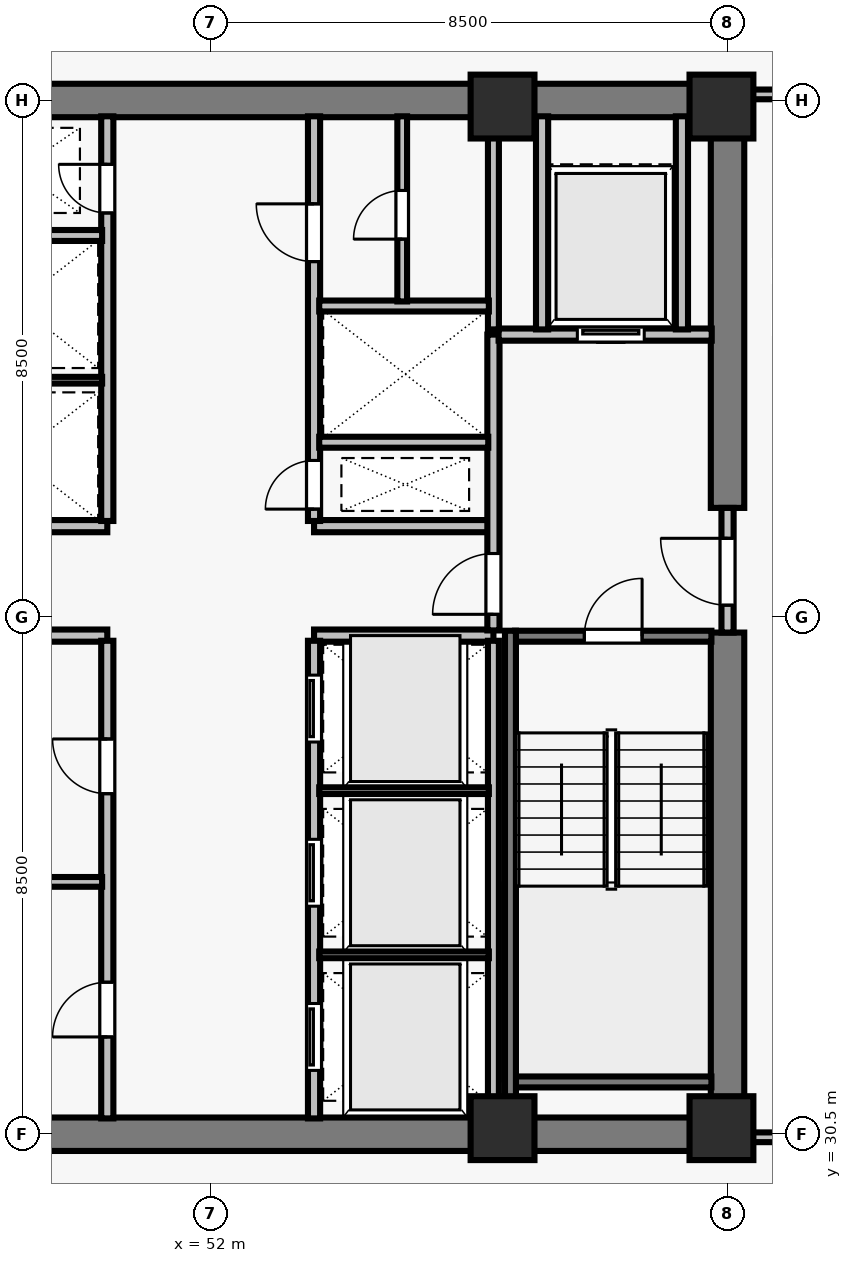
"""IFC4 building model, lengths in metres.
Left out: names, types, materials, properties, quantities, classifications, styles, units other than length and angle.
Written with IfcOpenShell. Run it as: python <this file> out.ifc"""

import sys

from ifc_helpers import new_model, si_unit, direction, frame, frame_2d, origin, origin_2d, place, context, subcontext, project, spatial, rectangle, extrude, element, fill, save


model = new_model("IFC4")
c1 = context("Model", 3, precision=1e-05, world=origin(), true_north=direction((0.0, 1.0)))
c2 = subcontext(c1, "Body", "Model", "MODEL_VIEW")
j1 = project(units=[si_unit("LENGTHUNIT", "METRE"), si_unit("PLANEANGLEUNIT", "RADIAN")], contexts=[c1])
p1 = place(None, origin())
s1 = spatial("IfcSite", under=j1, at=p1, CompositionType="ELEMENT")
p2 = place(p1, origin())
s2 = spatial("IfcBuilding", under=s1, at=p2, CompositionType="ELEMENT")
p3 = place(p2, frame((0.0, 0.0, 148.0)))
s3 = spatial("IfcBuildingStorey", under=s2, at=p3, CompositionType="ELEMENT", Elevation=148.0)
for number, where, z_axis, x_axis in (
    (1, (56.8, 30.6, 0.0), (0.0, 0.0, 1.0), (1.0, 0.0, 0.0)),
    (2, (60.4, 30.6, 0.0), (0.0, 0.0, 1.0), (1.0, 0.0, 0.0)),
    (3, (56.8, 47.4, 0.0), (0.0, 0.0, 1.0), (1.0, 0.0, 0.0)),
    (4, (60.4, 47.4, 0.0), (0.0, 0.0, 1.0), (1.0, 0.0, 0.0)),
):
    element("IfcColumn", number, at=place(p3, frame(where, z_axis=z_axis, x_axis=x_axis)), inside=s3, PredefinedType="COLUMN", context=c2, shape_type="SweptSolid", body=[
        extrude(rectangle(XDim=1.05, YDim=1.05, at=origin_2d()), origin(), (0.0, 0.0, 1.0), 3.5),
    ])
for number, where, z_axis, x_axis in (
    (5, (43.225, 30.5, 0.0), (0.0, 0.0, 1.0), (1.0, 0.0, 0.0)),
    (6, (43.225, 47.5, 0.0), (0.0, 0.0, 1.0), (1.0, 0.0, 0.0)),
):
    element("IfcWall", number, at=place(p3, frame(where, z_axis=z_axis, x_axis=x_axis)), inside=s3, PredefinedType="SHEAR", context=c2, shape_type="SweptSolid", body=[
        extrude(rectangle(XDim=17.55, YDim=0.55, at=frame_2d((8.775, 0.0))), origin(), (0.0, 0.0, 1.0), 3.28),
    ])
p4 = place(p3, frame((60.5, 30.765, 0.0), z_axis=(0.0, 0.0, 1.0), x_axis=(0.0, 1.0, 0.0)))
e7 = element("IfcWall", 7, at=p4, inside=s3, PredefinedType="SHEAR", context=c2, shape_type="SweptSolid", body=[
    extrude(rectangle(XDim=7.985, YDim=0.55, at=frame_2d((3.993, 0.0))), origin(), (0.0, 0.0, 1.0), 3.28),
])
p5 = place(p3, frame((60.5, 40.8, 0.0), z_axis=(0.0, 0.0, 1.0), x_axis=(0.0, 1.0, 0.0)))
e8 = element("IfcWall", 8, at=p5, inside=s3, PredefinedType="SHEAR", context=c2, shape_type="SweptSolid", body=[
    extrude(rectangle(XDim=6.435, YDim=0.55, at=frame_2d((3.218, 0.0))), origin(), (0.0, 0.0, 1.0), 3.28),
])
for number, where, z_axis, x_axis in (
    (9, (47.35, 38.7, 0.0), (0.0, 0.0, 1.0), (1.0, 0.0, 0.0)),
    (10, (47.35, 40.5, 0.0), (0.0, 0.0, 1.0), (1.0, 0.0, 0.0)),
    (11, (53.7, 38.7, 0.0), (0.0, 0.0, 1.0), (1.0, 0.0, 0.0)),
    (12, (53.7, 40.5, 0.0), (0.0, 0.0, 1.0), (1.0, 0.0, 0.0)),
):
    element("IfcWall", number, at=place(p3, frame(where, z_axis=z_axis, x_axis=x_axis)), inside=s3, PredefinedType="SOLIDWALL", context=c2, shape_type="SweptSolid", body=[
        extrude(rectangle(XDim=2.95, YDim=0.2, at=frame_2d((1.475, 0.0))), origin(), (0.0, 0.0, 1.0), 3.28),
    ])
p6 = place(p3, frame((50.3, 30.76, 0.0), z_axis=(0.0, 0.0, 1.0), x_axis=(0.0, 1.0, 0.0)))
e13 = element("IfcWall", 13, at=p6, inside=s3, PredefinedType="SOLIDWALL", context=c2, shape_type="SweptSolid", body=[
    extrude(rectangle(XDim=7.855, YDim=0.2, at=frame_2d((3.927, 0.0))), origin(), (0.0, 0.0, 1.0), 3.28),
])
p7 = place(p6, frame((1.34, 0.0, 0.0)))
e14 = element("IfcOpeningElement", 14, at=p7, cuts=e13, PredefinedType="OPENING", context=c2, shape_type="SweptSolid", body=[
    extrude(rectangle(XDim=0.9, YDim=2.12, at=frame_2d((0.45, 1.06))), frame((0.0, 0.11, 0.0), z_axis=(0.0, -1.0, 0.0), x_axis=(1.0, 0.0, 0.0)), (0.0, 0.0, 1.0), 0.22),
])
p8 = place(p6, frame((5.34, 0.0, 0.0)))
e15 = element("IfcOpeningElement", 15, at=p8, cuts=e13, PredefinedType="OPENING", context=c2, shape_type="SweptSolid", body=[
    extrude(rectangle(XDim=0.9, YDim=2.12, at=frame_2d((0.45, 1.06))), frame((0.0, 0.11, 0.0), z_axis=(0.0, -1.0, 0.0), x_axis=(1.0, 0.0, 0.0)), (0.0, 0.0, 1.0), 0.22),
])
p9 = place(p3, frame((53.7, 30.76, 0.0), z_axis=(0.0, 0.0, 1.0), x_axis=(0.0, 1.0, 0.0)))
e16 = element("IfcWall", 16, at=p9, inside=s3, PredefinedType="SOLIDWALL", context=c2, shape_type="SweptSolid", body=[
    extrude(rectangle(XDim=7.855, YDim=0.2, at=frame_2d((3.927, 0.0))), origin(), (0.0, 0.0, 1.0), 3.28),
])
p10 = place(p9, frame((0.79, 0.0, 0.0)))
e17 = element("IfcOpeningElement", 17, at=p10, cuts=e16, PredefinedType="OPENING", context=c2, shape_type="SweptSolid", body=[
    extrude(rectangle(XDim=1.1, YDim=2.2, at=frame_2d((0.55, 1.1))), frame((0.0, 0.11, 0.0), z_axis=(0.0, -1.0, 0.0), x_axis=(1.0, 0.0, 0.0)), (0.0, 0.0, 1.0), 0.22),
])
p11 = place(p9, frame((3.49, 0.0, 0.0)))
e18 = element("IfcOpeningElement", 18, at=p11, cuts=e16, PredefinedType="OPENING", context=c2, shape_type="SweptSolid", body=[
    extrude(rectangle(XDim=1.1, YDim=2.2, at=frame_2d((0.55, 1.1))), frame((0.0, 0.11, 0.0), z_axis=(0.0, -1.0, 0.0), x_axis=(1.0, 0.0, 0.0)), (0.0, 0.0, 1.0), 0.22),
])
p12 = place(p9, frame((6.19, 0.0, 0.0)))
e19 = element("IfcOpeningElement", 19, at=p12, cuts=e16, PredefinedType="OPENING", context=c2, shape_type="SweptSolid", body=[
    extrude(rectangle(XDim=1.1, YDim=2.2, at=frame_2d((0.55, 1.1))), frame((0.0, 0.11, 0.0), z_axis=(0.0, -1.0, 0.0), x_axis=(1.0, 0.0, 0.0)), (0.0, 0.0, 1.0), 0.22),
])
p13 = place(p3, frame((50.3, 40.585, 0.0), z_axis=(0.0, 0.0, 1.0), x_axis=(0.0, 1.0, 0.0)))
e20 = element("IfcWall", 20, at=p13, inside=s3, PredefinedType="SOLIDWALL", context=c2, shape_type="SweptSolid", body=[
    extrude(rectangle(XDim=6.655, YDim=0.2, at=frame_2d((3.328, 0.0))), origin(), (0.0, 0.0, 1.0), 3.28),
])
p14 = place(p13, frame((5.065, 0.0, 0.0)))
e21 = element("IfcOpeningElement", 21, at=p14, cuts=e20, PredefinedType="OPENING", context=c2, shape_type="SweptSolid", body=[
    extrude(rectangle(XDim=0.8, YDim=2.08, at=frame_2d((0.4, 1.04))), frame((0.0, 0.11, 0.0), z_axis=(0.0, -1.0, 0.0), x_axis=(1.0, 0.0, 0.0)), (0.0, 0.0, 1.0), 0.22),
])
p15 = place(p3, frame((53.7, 40.585, 0.0), z_axis=(0.0, 0.0, 1.0), x_axis=(0.0, 1.0, 0.0)))
e22 = element("IfcWall", 22, at=p15, inside=s3, PredefinedType="SOLIDWALL", context=c2, shape_type="SweptSolid", body=[
    extrude(rectangle(XDim=6.655, YDim=0.2, at=frame_2d((3.328, 0.0))), origin(), (0.0, 0.0, 1.0), 3.28),
])
p16 = place(p15, frame((0.195, 0.0, 0.0)))
e23 = element("IfcOpeningElement", 23, at=p16, cuts=e22, PredefinedType="OPENING", context=c2, shape_type="SweptSolid", body=[
    extrude(rectangle(XDim=0.8, YDim=2.08, at=frame_2d((0.4, 1.04))), frame((0.0, 0.11, 0.0), z_axis=(0.0, -1.0, 0.0), x_axis=(1.0, 0.0, 0.0)), (0.0, 0.0, 1.0), 0.22),
])
p17 = place(p15, frame((4.265, 0.0, 0.0)))
e24 = element("IfcOpeningElement", 24, at=p17, cuts=e22, PredefinedType="OPENING", context=c2, shape_type="SweptSolid", body=[
    extrude(rectangle(XDim=0.95, YDim=2.12, at=frame_2d((0.475, 1.06))), frame((0.0, 0.11, 0.0), z_axis=(0.0, -1.0, 0.0), x_axis=(1.0, 0.0, 0.0)), (0.0, 0.0, 1.0), 0.22),
])
p18 = place(p3, frame((60.5, 38.75, 0.0), z_axis=(0.0, 0.0, 1.0), x_axis=(0.0, 1.0, 0.0)))
e25 = element("IfcWall", 25, at=p18, inside=s3, PredefinedType="SOLIDWALL", context=c2, shape_type="SweptSolid", body=[
    extrude(rectangle(XDim=2.05, YDim=0.2, at=frame_2d((1.025, 0.0))), origin(), (0.0, 0.0, 1.0), 3.28),
])
p19 = place(p18, frame((0.45, 0.0, 0.0)))
e26 = element("IfcOpeningElement", 26, at=p19, cuts=e25, PredefinedType="OPENING", context=c2, shape_type="SweptSolid", body=[
    extrude(rectangle(XDim=1.1, YDim=2.15, at=frame_2d((0.55, 1.075))), frame((0.0, 0.11, 0.0), z_axis=(0.0, -1.0, 0.0), x_axis=(1.0, 0.0, 0.0)), (0.0, 0.0, 1.0), 0.22),
])
p20 = place(p3, frame((56.65, 38.785, 0.0), z_axis=(0.0, 0.0, 1.0), x_axis=(0.0, 1.0, 0.0)))
e27 = element("IfcWall", 27, at=p20, inside=s3, PredefinedType="SOLIDWALL", context=c2, shape_type="SweptSolid", body=[
    extrude(rectangle(XDim=4.865, YDim=0.2, at=frame_2d((2.433, 0.0))), origin(), (0.0, 0.0, 1.0), 3.28),
])
p21 = place(p20, frame((0.265, 0.0, 0.0)))
e28 = element("IfcOpeningElement", 28, at=p21, cuts=e27, PredefinedType="OPENING", context=c2, shape_type="SweptSolid", body=[
    extrude(rectangle(XDim=1.0, YDim=2.15, at=frame_2d((0.5, 1.075))), frame((0.0, 0.11, 0.0), z_axis=(0.0, -1.0, 0.0), x_axis=(1.0, 0.0, 0.0)), (0.0, 0.0, 1.0), 0.22),
])
p22 = place(p3, frame((56.735, 43.65, 0.0), z_axis=(0.0, 0.0, 1.0), x_axis=(1.0, 0.0, 0.0)))
e29 = element("IfcWall", 29, at=p22, inside=s3, PredefinedType="SOLIDWALL", context=c2, shape_type="SweptSolid", body=[
    extrude(rectangle(XDim=3.505, YDim=0.2, at=frame_2d((1.752, 0.0))), origin(), (0.0, 0.0, 1.0), 3.28),
])
p23 = place(p22, frame((1.295, 0.0, 0.0)))
e30 = element("IfcOpeningElement", 30, at=p23, cuts=e29, PredefinedType="OPENING", context=c2, shape_type="SweptSolid", body=[
    extrude(rectangle(XDim=1.1, YDim=2.2, at=frame_2d((0.55, 1.1))), frame((0.0, 0.11, 0.0), z_axis=(0.0, -1.0, 0.0), x_axis=(1.0, 0.0, 0.0)), (0.0, 0.0, 1.0), 0.22),
])
for number, where, z_axis, x_axis in (
    (31, (57.45, 43.735, 0.0), (0.0, 0.0, 1.0), (0.0, 1.0, 0.0)),
    (32, (59.75, 43.735, 0.0), (0.0, 0.0, 1.0), (0.0, 1.0, 0.0)),
):
    element("IfcWall", number, at=place(p3, frame(where, z_axis=z_axis, x_axis=x_axis)), inside=s3, PredefinedType="SOLIDWALL", context=c2, shape_type="SweptSolid", body=[
        extrude(rectangle(XDim=3.505, YDim=0.2, at=frame_2d((1.752, 0.0))), origin(), (0.0, 0.0, 1.0), 3.28),
    ])
p24 = place(p3, frame((47.415, 34.65, 0.0), z_axis=(0.0, 0.0, 1.0), x_axis=(1.0, 0.0, 0.0)))
e33 = element("IfcWall", 33, at=p24, inside=s3, PredefinedType="PARTITIONING", context=c2, shape_type="SweptSolid", body=[
    extrude(rectangle(XDim=2.8, YDim=0.16, at=frame_2d((1.4, 0.0))), origin(), (0.0, 0.0, 1.0), 3.28),
])
p25 = place(p3, frame((56.65, 30.76, 0.0), z_axis=(0.0, 0.0, 1.0), x_axis=(0.0, 1.0, 0.0)))
e34 = element("IfcWall", 34, at=p25, inside=s3, PredefinedType="SOLIDWALL", context=c2, shape_type="SweptSolid", body=[
    extrude(rectangle(XDim=7.855, YDim=0.18, at=frame_2d((3.927, 0.0))), origin(), (0.0, 0.0, 1.0), 3.28),
])
for number, where, z_axis, x_axis in (
    (35, (53.785, 33.45, 0.0), (0.0, 0.0, 1.0), (1.0, 0.0, 0.0)),
    (36, (53.785, 36.15, 0.0), (0.0, 0.0, 1.0), (1.0, 0.0, 0.0)),
):
    element("IfcWall", number, at=place(p3, frame(where, z_axis=z_axis, x_axis=x_axis)), inside=s3, PredefinedType="PARTITIONING", context=c2, shape_type="SweptSolid", body=[
        extrude(rectangle(XDim=2.79, YDim=0.11, at=frame_2d((1.395, 0.0))), origin(), (0.0, 0.0, 1.0), 3.28),
    ])
p26 = place(p3, frame((47.435, 42.9, 0.0), z_axis=(0.0, 0.0, 1.0), x_axis=(1.0, 0.0, 0.0)))
e37 = element("IfcWall", 37, at=p26, inside=s3, PredefinedType="PARTITIONING", context=c2, shape_type="SweptSolid", body=[
    extrude(rectangle(XDim=2.78, YDim=0.11, at=frame_2d((1.39, 0.0))), origin(), (0.0, 0.0, 1.0), 3.28),
])
p27 = place(p3, frame((47.425, 45.28, 0.0), z_axis=(0.0, 0.0, 1.0), x_axis=(1.0, 0.0, 0.0)))
e38 = element("IfcWall", 38, at=p27, inside=s3, PredefinedType="SOLIDWALL", context=c2, shape_type="SweptSolid", body=[
    extrude(rectangle(XDim=2.79, YDim=0.18, at=frame_2d((1.395, 0.0))), origin(), (0.0, 0.0, 1.0), 3.28),
])
p28 = place(p3, frame((56.65, 43.735, 0.0), z_axis=(0.0, 0.0, 1.0), x_axis=(0.0, 1.0, 0.0)))
e39 = element("IfcWall", 39, at=p28, inside=s3, PredefinedType="SOLIDWALL", context=c2, shape_type="SweptSolid", body=[
    extrude(rectangle(XDim=3.505, YDim=0.18, at=frame_2d((1.752, 0.0))), origin(), (0.0, 0.0, 1.0), 3.28),
])
p29 = place(p3, frame((53.785, 41.88, 0.0), z_axis=(0.0, 0.0, 1.0), x_axis=(1.0, 0.0, 0.0)))
e40 = element("IfcWall", 40, at=p29, inside=s3, PredefinedType="SOLIDWALL", context=c2, shape_type="SweptSolid", body=[
    extrude(rectangle(XDim=2.78, YDim=0.18, at=frame_2d((1.39, 0.0))), origin(), (0.0, 0.0, 1.0), 3.28),
])
p30 = place(p3, frame((53.785, 44.12, 0.0), z_axis=(0.0, 0.0, 1.0), x_axis=(1.0, 0.0, 0.0)))
e41 = element("IfcWall", 41, at=p30, inside=s3, PredefinedType="SOLIDWALL", context=c2, shape_type="SweptSolid", body=[
    extrude(rectangle(XDim=2.79, YDim=0.18, at=frame_2d((1.395, 0.0))), origin(), (0.0, 0.0, 1.0), 3.28),
])
p31 = place(p3, frame((55.15, 44.195, 0.0), z_axis=(0.0, 0.0, 1.0), x_axis=(0.0, 1.0, 0.0)))
e42 = element("IfcWall", 42, at=p31, inside=s3, PredefinedType="PARTITIONING", context=c2, shape_type="SweptSolid", body=[
    extrude(rectangle(XDim=3.045, YDim=0.16, at=frame_2d((1.522, 0.0))), origin(), (0.0, 0.0, 1.0), 3.28),
])
p32 = place(p31, frame((1.025, 0.0, 0.0)))
e43 = element("IfcOpeningElement", 43, at=p32, cuts=e42, PredefinedType="OPENING", context=c2, shape_type="SweptSolid", body=[
    extrude(rectangle(XDim=0.8, YDim=2.1, at=frame_2d((0.4, 1.05))), frame((0.0, 0.09, 0.0), z_axis=(0.0, -1.0, 0.0), x_axis=(1.0, 0.0, 0.0)), (0.0, 0.0, 1.0), 0.18),
])
p33 = place(p3, frame((60.765, 30.45, 0.0), z_axis=(0.0, 0.0, 1.0), x_axis=(1.0, 0.0, 0.0)))
e44 = element("IfcWall", 44, at=p33, inside=s3, PredefinedType="PARTITIONING", context=c2, shape_type="SweptSolid", body=[
    extrude(rectangle(XDim=3.085, YDim=0.16, at=frame_2d((1.542, 0.0))), origin(), (0.0, 0.0, 1.0), 3.28),
])
p34 = place(p3, frame((60.765, 47.6, 0.0), z_axis=(0.0, 0.0, 1.0), x_axis=(1.0, 0.0, 0.0)))
e45 = element("IfcWall", 45, at=p34, inside=s3, PredefinedType="PARTITIONING", context=c2, shape_type="SweptSolid", body=[
    extrude(rectangle(XDim=3.02, YDim=0.16, at=frame_2d((1.51, 0.0))), origin(), (0.0, 0.0, 1.0), 3.28),
])
p35 = place(p3, frame((57.005, 38.69, 0.0), z_axis=(0.0, 0.0, 1.0), x_axis=(1.0, 0.0, 0.0)))
e46 = element("IfcWall", 46, at=p35, inside=s3, PredefinedType="SOLIDWALL", context=c2, shape_type="SweptSolid", body=[
    extrude(rectangle(XDim=3.23, YDim=0.18, at=frame_2d((1.615, 0.0))), origin(), (0.0, 0.0, 1.0), 3.28),
])
p36 = place(p35, frame((1.14, 0.0, 0.0)))
e47 = element("IfcOpeningElement", 47, at=p36, cuts=e46, PredefinedType="OPENING", context=c2, shape_type="SweptSolid", body=[
    extrude(rectangle(XDim=0.95, YDim=2.15, at=frame_2d((0.475, 1.075))), frame((0.0, 0.1, 0.0), z_axis=(0.0, -1.0, 0.0), x_axis=(1.0, 0.0, 0.0)), (0.0, 0.0, 1.0), 0.2),
])
p37 = place(p3, frame((57.005, 31.36, 0.0), z_axis=(0.0, 0.0, 1.0), x_axis=(1.0, 0.0, 0.0)))
e48 = element("IfcWall", 48, at=p37, inside=s3, PredefinedType="SOLIDWALL", context=c2, shape_type="SweptSolid", body=[
    extrude(rectangle(XDim=3.23, YDim=0.18, at=frame_2d((1.615, 0.0))), origin(), (0.0, 0.0, 1.0), 3.28),
])
p38 = place(p3, frame((56.93, 38.78, 0.0), z_axis=(0.0, 0.0, 1.0), x_axis=(0.0, -1.0, 0.0)))
e49 = element("IfcWall", 49, at=p38, inside=s3, PredefinedType="SOLIDWALL", context=c2, shape_type="SweptSolid", body=[
    extrude(rectangle(XDim=8.017, YDim=0.18, at=frame_2d((4.009, 0.0))), origin(), (0.0, 0.0, 1.0), 3.28),
])
p39 = place(p19, origin())
e50 = element("IfcDoor", 50, at=p39, inside=s3, OperationType="SINGLE_SWING_RIGHT", PredefinedType="DOOR", context=c2, shape_type="SweptSolid", body=[
    extrude(rectangle(XDim=1.1, YDim=2.15, at=frame_2d((0.55, 1.075))), frame((0.0, 0.025, 0.0), z_axis=(0.0, -1.0, 0.0), x_axis=(1.0, 0.0, 0.0)), (0.0, 0.0, 1.0), 0.05),
])
fill(e26, e50)
p40 = place(p21, origin())
e51 = element("IfcDoor", 51, at=p40, inside=s3, OperationType="SINGLE_SWING_LEFT", PredefinedType="DOOR", context=c2, shape_type="SweptSolid", body=[
    extrude(rectangle(XDim=1.0, YDim=2.15, at=frame_2d((0.5, 1.075))), frame((0.0, 0.025, 0.0), z_axis=(0.0, -1.0, 0.0), x_axis=(1.0, 0.0, 0.0)), (0.0, 0.0, 1.0), 0.05),
])
fill(e28, e51)
p41 = place(p23, origin())
e52 = element("IfcDoor", 52, at=p41, inside=s3, OperationType="SLIDING_TO_LEFT", PredefinedType="DOOR", context=c2, shape_type="SweptSolid", body=[
    extrude(rectangle(XDim=1.1, YDim=2.2, at=frame_2d((0.55, 1.1))), frame((0.0, 0.025, 0.0), z_axis=(0.0, -1.0, 0.0), x_axis=(1.0, 0.0, 0.0)), (0.0, 0.0, 1.0), 0.05),
])
fill(e30, e52)
p42 = place(p7, origin())
e53 = element("IfcDoor", 53, at=p42, inside=s3, OperationType="SINGLE_SWING_LEFT", PredefinedType="DOOR", context=c2, shape_type="SweptSolid", body=[
    extrude(rectangle(XDim=0.9, YDim=2.12, at=frame_2d((0.45, 1.06))), frame((0.0, 0.025, 0.0), z_axis=(0.0, -1.0, 0.0), x_axis=(1.0, 0.0, 0.0)), (0.0, 0.0, 1.0), 0.05),
])
fill(e14, e53)
p43 = place(p8, origin())
e54 = element("IfcDoor", 54, at=p43, inside=s3, OperationType="SINGLE_SWING_RIGHT", PredefinedType="DOOR", context=c2, shape_type="SweptSolid", body=[
    extrude(rectangle(XDim=0.9, YDim=2.12, at=frame_2d((0.45, 1.06))), frame((0.0, 0.025, 0.0), z_axis=(0.0, -1.0, 0.0), x_axis=(1.0, 0.0, 0.0)), (0.0, 0.0, 1.0), 0.05),
])
fill(e15, e54)
p44 = place(p10, origin())
e55 = element("IfcDoor", 55, at=p44, inside=s3, OperationType="SLIDING_TO_LEFT", PredefinedType="DOOR", context=c2, shape_type="SweptSolid", body=[
    extrude(rectangle(XDim=1.1, YDim=2.2, at=frame_2d((0.55, 1.1))), frame((0.0, 0.025, 0.0), z_axis=(0.0, -1.0, 0.0), x_axis=(1.0, 0.0, 0.0)), (0.0, 0.0, 1.0), 0.05),
])
fill(e17, e55)
p45 = place(p11, origin())
e56 = element("IfcDoor", 56, at=p45, inside=s3, OperationType="SLIDING_TO_LEFT", PredefinedType="DOOR", context=c2, shape_type="SweptSolid", body=[
    extrude(rectangle(XDim=1.1, YDim=2.2, at=frame_2d((0.55, 1.1))), frame((0.0, 0.025, 0.0), z_axis=(0.0, -1.0, 0.0), x_axis=(1.0, 0.0, 0.0)), (0.0, 0.0, 1.0), 0.05),
])
fill(e18, e56)
p46 = place(p12, origin())
e57 = element("IfcDoor", 57, at=p46, inside=s3, OperationType="SLIDING_TO_LEFT", PredefinedType="DOOR", context=c2, shape_type="SweptSolid", body=[
    extrude(rectangle(XDim=1.1, YDim=2.2, at=frame_2d((0.55, 1.1))), frame((0.0, 0.025, 0.0), z_axis=(0.0, -1.0, 0.0), x_axis=(1.0, 0.0, 0.0)), (0.0, 0.0, 1.0), 0.05),
])
fill(e19, e57)
p47 = place(p14, origin())
e58 = element("IfcDoor", 58, at=p47, inside=s3, OperationType="SINGLE_SWING_RIGHT", PredefinedType="DOOR", context=c2, shape_type="SweptSolid", body=[
    extrude(rectangle(XDim=0.8, YDim=2.08, at=frame_2d((0.4, 1.04))), frame((0.0, 0.025, 0.0), z_axis=(0.0, -1.0, 0.0), x_axis=(1.0, 0.0, 0.0)), (0.0, 0.0, 1.0), 0.05),
])
fill(e21, e58)
p48 = place(p16, origin())
e59 = element("IfcDoor", 59, at=p48, inside=s3, OperationType="SINGLE_SWING_LEFT", PredefinedType="DOOR", context=c2, shape_type="SweptSolid", body=[
    extrude(rectangle(XDim=0.8, YDim=2.08, at=frame_2d((0.4, 1.04))), frame((0.0, 0.025, 0.0), z_axis=(0.0, -1.0, 0.0), x_axis=(1.0, 0.0, 0.0)), (0.0, 0.0, 1.0), 0.05),
])
fill(e23, e59)
p49 = place(p17, origin())
e60 = element("IfcDoor", 60, at=p49, inside=s3, OperationType="SINGLE_SWING_RIGHT", PredefinedType="DOOR", context=c2, shape_type="SweptSolid", body=[
    extrude(rectangle(XDim=0.95, YDim=2.12, at=frame_2d((0.475, 1.06))), frame((0.0, 0.025, 0.0), z_axis=(0.0, -1.0, 0.0), x_axis=(1.0, 0.0, 0.0)), (0.0, 0.0, 1.0), 0.05),
])
fill(e24, e60)
p50 = place(p32, origin())
e61 = element("IfcDoor", 61, at=p50, inside=s3, OperationType="SINGLE_SWING_LEFT", PredefinedType="DOOR", context=c2, shape_type="SweptSolid", body=[
    extrude(rectangle(XDim=0.8, YDim=2.1, at=frame_2d((0.4, 1.05))), frame((0.0, 0.025, 0.0), z_axis=(0.0, -1.0, 0.0), x_axis=(1.0, 0.0, 0.0)), (0.0, 0.0, 1.0), 0.05),
])
fill(e43, e61)
p51 = place(p36, origin())
e62 = element("IfcDoor", 62, at=p51, inside=s3, OperationType="SINGLE_SWING_RIGHT", PredefinedType="DOOR", context=c2, shape_type="SweptSolid", body=[
    extrude(rectangle(XDim=0.95, YDim=2.15, at=frame_2d((0.475, 1.075))), frame((0.0, 0.025, 0.0), z_axis=(0.0, -1.0, 0.0), x_axis=(1.0, 0.0, 0.0)), (0.0, 0.0, 1.0), 0.05),
])
fill(e47, e62)
save(model, sys.argv[1])
